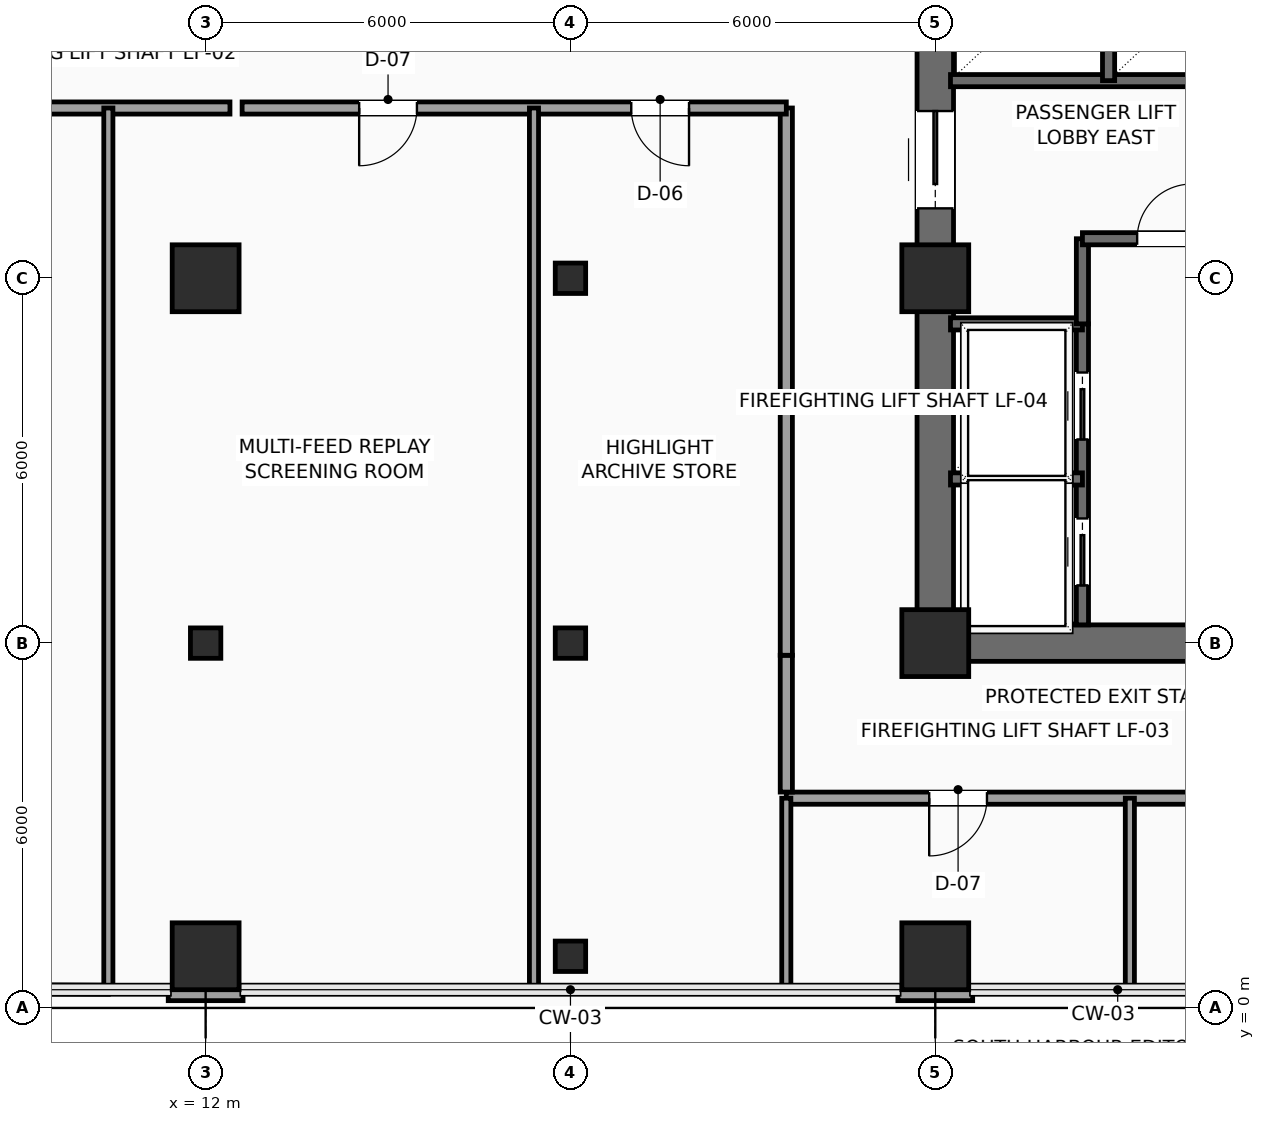
"""IFC4 building model, lengths in metres.
Left out: names, types, materials, properties, quantities, classifications, styles, units other than length and angle.
Written with IfcOpenShell. Run it as: python <this file> out.ifc"""

import sys

from ifc_helpers import new_model, si_unit, direction, frame, frame_2d, origin, origin_2d, place, context, subcontext, project, spatial, rectangle, hollow_rectangle, extrude, element, fill, save


model = new_model("IFC4")
c1 = context("Model", 3, precision=1e-05, world=origin(), true_north=direction((0.0, 1.0)))
c2 = subcontext(c1, "Body", "Model", "MODEL_VIEW")
j1 = project(units=[si_unit("LENGTHUNIT", "METRE"), si_unit("PLANEANGLEUNIT", "RADIAN")], contexts=[c1])
p1 = place(None, origin())
s1 = spatial("IfcSite", under=j1, at=p1, CompositionType="ELEMENT")
p2 = place(p1, origin())
s2 = spatial("IfcBuilding", under=s1, at=p2, CompositionType="ELEMENT")
p3 = place(p2, frame((0.0, 0.0, 107.1)))
s3 = spatial("IfcBuildingStorey", under=s2, at=p3, CompositionType="ELEMENT", Elevation=107.1)
for number, where, z_axis, x_axis in (
    (1, (24.0, 6.0, 0.0), (0.0, 0.0, 1.0), (1.0, 0.0, 0.0)),
    (2, (24.0, 12.0, 0.0), (0.0, 0.0, 1.0), (1.0, 0.0, 0.0)),
    (3, (12.0, 0.85, 0.0), (0.0, 0.0, 1.0), (1.0, 0.0, 0.0)),
):
    element("IfcColumn", number, at=place(p3, frame(where, z_axis=z_axis, x_axis=x_axis)), inside=s3, PredefinedType="COLUMN", context=c2, shape_type="SweptSolid", body=[
        extrude(rectangle(XDim=1.1, YDim=1.1, at=origin_2d()), origin(), (0.0, 0.0, 1.0), 3.75),
    ])
p4 = place(p3, frame((12.0, 6.0, 0.0), z_axis=(0.0, 0.0, 1.0), x_axis=(1.0, 0.0, 0.0)))
e4 = element("IfcColumn", 4, at=p4, inside=s3, PredefinedType="COLUMN", context=c2, shape_type="SweptSolid", body=[
    extrude(hollow_rectangle(XDim=0.5, YDim=0.5, WallThickness=0.025, InnerFilletRadius=0.025, OuterFilletRadius=0.04, at=origin_2d()), origin(), (0.0, 0.0, 1.0), 3.75),
])
p5 = place(p3, frame((12.0, 12.0, 0.0), z_axis=(0.0, 0.0, 1.0), x_axis=(1.0, 0.0, 0.0)))
e5 = element("IfcColumn", 5, at=p5, inside=s3, PredefinedType="COLUMN", context=c2, shape_type="SweptSolid", body=[
    extrude(rectangle(XDim=1.1, YDim=1.1, at=origin_2d()), origin(), (0.0, 0.0, 1.0), 3.75),
])
for number, where, z_axis, x_axis in (
    (6, (18.0, 0.85, 0.0), (0.0, 0.0, 1.0), (1.0, 0.0, 0.0)),
    (7, (18.0, 6.0, 0.0), (0.0, 0.0, 1.0), (1.0, 0.0, 0.0)),
    (8, (18.0, 12.0, 0.0), (0.0, 0.0, 1.0), (1.0, 0.0, 0.0)),
):
    element("IfcColumn", number, at=place(p3, frame(where, z_axis=z_axis, x_axis=x_axis)), inside=s3, PredefinedType="COLUMN", context=c2, shape_type="SweptSolid", body=[
        extrude(hollow_rectangle(XDim=0.5, YDim=0.5, WallThickness=0.025, InnerFilletRadius=0.025, OuterFilletRadius=0.04, at=origin_2d()), origin(), (0.0, 0.0, 1.0), 3.75),
    ])
p6 = place(p3, frame((24.0, 0.85, 0.0), z_axis=(0.0, 0.0, 1.0), x_axis=(1.0, 0.0, 0.0)))
e9 = element("IfcColumn", 9, at=p6, inside=s3, PredefinedType="COLUMN", context=c2, shape_type="SweptSolid", body=[
    extrude(rectangle(XDim=1.1, YDim=1.1, at=origin_2d()), origin(), (0.0, 0.0, 1.0), 3.75),
])
for number, where, z_axis, x_axis in (
    (10, (24.615, 0.24, 0.0), (0.0, 0.0, 1.0), (-1.0, 0.0, 0.0)),
    (11, (12.615, 0.24, 0.0), (0.0, 0.0, 1.0), (-1.0, 0.0, 0.0)),
):
    element("IfcWall", number, at=place(p3, frame(where, z_axis=z_axis, x_axis=x_axis)), inside=s3, PredefinedType="SOLIDWALL", context=c2, shape_type="SweptSolid", body=[
        extrude(rectangle(XDim=1.23, YDim=0.24, at=frame_2d((0.615, 0.0))), origin(), (0.0, 0.0, 1.0), 3.475),
    ])
p7 = place(p3, frame((24.0, 6.0, 0.0), z_axis=(0.0, 0.0, 1.0), x_axis=(1.0, 0.0, 0.0)))
e12 = element("IfcWall", 12, at=p7, inside=s3, PredefinedType="SHEAR", context=c2, shape_type="SweptSolid", body=[
    extrude(rectangle(XDim=9.6, YDim=0.6, at=frame_2d((4.8, 0.0))), origin(), (0.0, 0.0, 1.0), 3.475),
])
p8 = place(p3, frame((24.0, 6.0, 0.0), z_axis=(0.0, 0.0, 1.0), x_axis=(0.0, 1.0, 0.0)))
e13 = element("IfcWall", 13, at=p8, inside=s3, PredefinedType="SHEAR", context=c2, shape_type="SweptSolid", body=[
    extrude(rectangle(XDim=12.0, YDim=0.6, at=frame_2d((6.0, 0.0))), origin(), (0.0, 0.0, 1.0), 3.475),
])
p9 = place(p8, frame((7.15, 0.0, 0.0)))
e14 = element("IfcOpeningElement", 14, at=p9, cuts=e13, PredefinedType="OPENING", context=c2, shape_type="SweptSolid", body=[
    extrude(rectangle(XDim=1.6, YDim=2.3, at=frame_2d((0.8, 1.15))), frame((0.0, 0.31, 0.0), z_axis=(0.0, -1.0, 0.0), x_axis=(1.0, 0.0, 0.0)), (0.0, 0.0, 1.0), 0.62),
])
p10 = place(p3, frame((26.42, 6.3, 0.0), z_axis=(0.0, 0.0, 1.0), x_axis=(0.0, 1.0, 0.0)))
e15 = element("IfcWall", 15, at=p10, inside=s3, PredefinedType="SHEAR", context=c2, shape_type="SweptSolid", body=[
    extrude(rectangle(XDim=4.95, YDim=0.2, at=frame_2d((2.475, 0.0))), origin(), (0.0, 0.0, 1.0), 3.475),
])
p11 = place(p10, frame((0.65, 0.0, 0.0)))
e16 = element("IfcOpeningElement", 16, at=p11, cuts=e15, PredefinedType="OPENING", context=c2, shape_type="SweptSolid", body=[
    extrude(rectangle(XDim=1.1, YDim=2.2, at=frame_2d((0.55, 1.1))), frame((0.0, 0.11, 0.0), z_axis=(0.0, -1.0, 0.0), x_axis=(1.0, 0.0, 0.0)), (0.0, 0.0, 1.0), 0.22),
])
p12 = place(p10, frame((3.05, 0.0, 0.0)))
e17 = element("IfcOpeningElement", 17, at=p12, cuts=e15, PredefinedType="OPENING", context=c2, shape_type="SweptSolid", body=[
    extrude(rectangle(XDim=1.1, YDim=2.2, at=frame_2d((0.55, 1.1))), frame((0.0, 0.11, 0.0), z_axis=(0.0, -1.0, 0.0), x_axis=(1.0, 0.0, 0.0)), (0.0, 0.0, 1.0), 0.22),
])
for number, where, z_axis, x_axis in (
    (18, (24.25, 8.7, 0.0), (0.0, 0.0, 1.0), (1.0, 0.0, 0.0)),
    (19, (24.25, 11.25, 0.0), (0.0, 0.0, 1.0), (1.0, 0.0, 0.0)),
):
    element("IfcWall", number, at=place(p3, frame(where, z_axis=z_axis, x_axis=x_axis)), inside=s3, PredefinedType="SHEAR", context=c2, shape_type="SweptSolid", body=[
        extrude(rectangle(XDim=2.17, YDim=0.2, at=frame_2d((1.085, 0.0))), origin(), (0.0, 0.0, 1.0), 3.475),
    ])
p13 = place(p3, frame((26.42, 11.25, 0.0), z_axis=(0.0, 0.0, 1.0), x_axis=(0.0, 1.0, 0.0)))
e20 = element("IfcWall", 20, at=p13, inside=s3, PredefinedType="SHEAR", context=c2, shape_type="SweptSolid", body=[
    extrude(rectangle(XDim=1.4, YDim=0.2, at=frame_2d((0.7, 0.0))), origin(), (0.0, 0.0, 1.0), 3.475),
])
p14 = place(p3, frame((26.42, 12.65, 0.0), z_axis=(0.0, 0.0, 1.0), x_axis=(1.0, 0.0, 0.0)))
e21 = element("IfcWall", 21, at=p14, inside=s3, PredefinedType="SHEAR", context=c2, shape_type="SweptSolid", body=[
    extrude(rectangle(XDim=2.84, YDim=0.2, at=frame_2d((1.42, 0.0))), origin(), (0.0, 0.0, 1.0), 3.475),
])
p15 = place(p14, frame((0.9, 0.0, 0.0)))
e22 = element("IfcOpeningElement", 22, at=p15, cuts=e21, PredefinedType="OPENING", context=c2, shape_type="SweptSolid", body=[
    extrude(rectangle(XDim=0.9, YDim=2.15, at=frame_2d((0.45, 1.075))), frame((0.0, 0.11, 0.0), z_axis=(0.0, -1.0, 0.0), x_axis=(1.0, 0.0, 0.0)), (0.0, 0.0, 1.0), 0.22),
])
p16 = place(p3, frame((24.25, 15.25, 0.0), z_axis=(0.0, 0.0, 1.0), x_axis=(1.0, 0.0, 0.0)))
e23 = element("IfcWall", 23, at=p16, inside=s3, PredefinedType="SHEAR", context=c2, shape_type="SweptSolid", body=[
    extrude(rectangle(XDim=5.2, YDim=0.2, at=frame_2d((2.6, 0.0))), origin(), (0.0, 0.0, 1.0), 3.475),
])
p17 = place(p3, frame((26.85, 15.25, 0.0), z_axis=(0.0, 0.0, 1.0), x_axis=(0.0, 1.0, 0.0)))
e24 = element("IfcWall", 24, at=p17, inside=s3, PredefinedType="SHEAR", context=c2, shape_type="SweptSolid", body=[
    extrude(rectangle(XDim=2.4, YDim=0.2, at=frame_2d((1.2, 0.0))), origin(), (0.0, 0.0, 1.0), 3.475),
])
p18 = place(p3, frame((36.15, 3.45, 0.0), z_axis=(0.0, 0.0, 1.0), x_axis=(-1.0, 0.0, 0.0)))
e25 = element("IfcWall", 25, at=p18, inside=s3, PredefinedType="PARTITIONING", context=c2, shape_type="SweptSolid", body=[
    extrude(rectangle(XDim=14.6, YDim=0.2, at=frame_2d((7.3, 0.0))), origin(), (0.0, 0.0, 1.0), 3.017),
])
p19 = place(p18, frame((11.3, 0.0, 0.0)))
e26 = element("IfcOpeningElement", 26, at=p19, cuts=e25, PredefinedType="OPENING", context=c2, shape_type="SweptSolid", body=[
    extrude(rectangle(XDim=0.95, YDim=2.15, at=frame_2d((0.475, 1.075))), frame((0.0, 0.11, 0.0), z_axis=(0.0, -1.0, 0.0), x_axis=(1.0, 0.0, 0.0)), (0.0, 0.0, 1.0), 0.22),
])
p20 = place(p18, frame((5.675, 0.0, 0.0)))
e27 = element("IfcOpeningElement", 27, at=p20, cuts=e25, PredefinedType="OPENING", context=c2, shape_type="SweptSolid", body=[
    extrude(rectangle(XDim=0.95, YDim=2.15, at=frame_2d((0.475, 1.075))), frame((0.0, 0.11, 0.0), z_axis=(0.0, -1.0, 0.0), x_axis=(1.0, 0.0, 0.0)), (0.0, 0.0, 1.0), 0.22),
])
p21 = place(p3, frame((21.55, 3.55, 0.0), z_axis=(0.0, 0.0, 1.0), x_axis=(0.0, 1.0, 0.0)))
e28 = element("IfcWall", 28, at=p21, inside=s3, PredefinedType="PARTITIONING", context=c2, shape_type="SweptSolid", body=[
    extrude(rectangle(XDim=2.25, YDim=0.2, at=frame_2d((1.125, 0.0))), origin(), (0.0, 0.0, 1.0), 3.475),
])
p22 = place(p3, frame((21.55, 5.8, 0.0), z_axis=(0.0, 0.0, 1.0), x_axis=(0.0, 1.0, 0.0)))
e29 = element("IfcWall", 29, at=p22, inside=s3, PredefinedType="PARTITIONING", context=c2, shape_type="SweptSolid", body=[
    extrude(rectangle(XDim=9.0, YDim=0.2, at=frame_2d((4.5, 0.0))), origin(), (0.0, 0.0, 1.0), 3.475),
])
p23 = place(p3, frame((21.55, 14.8, 0.0), z_axis=(0.0, 0.0, 1.0), x_axis=(-1.0, 0.0, 0.0)))
e30 = element("IfcWall", 30, at=p23, inside=s3, PredefinedType="PARTITIONING", context=c2, shape_type="SweptSolid", body=[
    extrude(rectangle(XDim=8.95, YDim=0.2, at=frame_2d((4.475, 0.0))), origin(), (0.0, 0.0, 1.0), 3.017),
])
p24 = place(p23, frame((6.075, 0.0, 0.0)))
e31 = element("IfcOpeningElement", 31, at=p24, cuts=e30, PredefinedType="OPENING", context=c2, shape_type="SweptSolid", body=[
    extrude(rectangle(XDim=0.95, YDim=2.15, at=frame_2d((0.475, 1.075))), frame((0.0, 0.11, 0.0), z_axis=(0.0, -1.0, 0.0), x_axis=(1.0, 0.0, 0.0)), (0.0, 0.0, 1.0), 0.22),
])
p25 = place(p23, frame((1.6, 0.0, 0.0)))
e32 = element("IfcOpeningElement", 32, at=p25, cuts=e30, PredefinedType="OPENING", context=c2, shape_type="SweptSolid", body=[
    extrude(rectangle(XDim=0.95, YDim=2.15, at=frame_2d((0.475, 1.075))), frame((0.0, 0.11, 0.0), z_axis=(0.0, -1.0, 0.0), x_axis=(1.0, 0.0, 0.0)), (0.0, 0.0, 1.0), 0.22),
])
p26 = place(p3, frame((12.4, 14.8, 0.0), z_axis=(0.0, 0.0, 1.0), x_axis=(-1.0, 0.0, 0.0)))
e33 = element("IfcWall", 33, at=p26, inside=s3, PredefinedType="PARTITIONING", context=c2, shape_type="SweptSolid", body=[
    extrude(rectangle(XDim=7.15, YDim=0.2, at=frame_2d((3.575, 0.0))), origin(), (0.0, 0.0, 1.0), 3.017),
])
p27 = place(p26, frame((4.1, 0.0, 0.0)))
e34 = element("IfcOpeningElement", 34, at=p27, cuts=e33, PredefinedType="OPENING", context=c2, shape_type="SweptSolid", body=[
    extrude(rectangle(XDim=0.95, YDim=2.15, at=frame_2d((0.475, 1.075))), frame((0.0, 0.11, 0.0), z_axis=(0.0, -1.0, 0.0), x_axis=(1.0, 0.0, 0.0)), (0.0, 0.0, 1.0), 0.22),
])
p28 = place(p3, frame((0.35, 0.35, 0.0), z_axis=(0.0, 0.0, 1.0), x_axis=(0.999987599634, -0.004980017926, 0.0)))
e35 = element("IfcWall", 35, at=p28, inside=s3, PredefinedType="PARTITIONING", context=c2, shape_type="SweptSolid", body=[
    extrude(rectangle(XDim=10.05, YDim=0.15, at=frame_2d((5.025, 0.0))), origin(), (0.0, 0.0, 1.0), 3.475),
])
for number, where, z_axis, x_axis in (
    (36, (10.4, 0.3, 0.0), (0.0, 0.0, 1.0), (0.0, 1.0, 0.0)),
    (37, (17.4, 0.3, 0.0), (0.0, 0.0, 1.0), (0.0, 1.0, 0.0)),
):
    element("IfcWall", number, at=place(p3, frame(where, z_axis=z_axis, x_axis=x_axis)), inside=s3, PredefinedType="PARTITIONING", context=c2, shape_type="SweptSolid", body=[
        extrude(rectangle(XDim=14.5, YDim=0.15, at=frame_2d((7.25, 0.0))), origin(), (0.0, 0.0, 1.0), 3.475),
    ])
for number, where, z_axis, x_axis in (
    (38, (21.55, 0.3, 0.0), (0.0, 0.0, 1.0), (0.0, 1.0, 0.0)),
    (39, (27.2, 0.3, 0.0), (0.0, 0.0, 1.0), (0.0, 1.0, 0.0)),
):
    element("IfcWall", number, at=place(p3, frame(where, z_axis=z_axis, x_axis=x_axis)), inside=s3, PredefinedType="PARTITIONING", context=c2, shape_type="SweptSolid", body=[
        extrude(rectangle(XDim=3.15, YDim=0.15, at=frame_2d((1.575, 0.0))), origin(), (0.0, 0.0, 1.0), 3.475),
    ])
p29 = place(p9, origin())
e40 = element("IfcDoor", 40, at=p29, inside=s3, OperationType="DOUBLE_DOOR_SLIDING", PredefinedType="DOOR", context=c2, shape_type="SweptSolid", body=[
    extrude(rectangle(XDim=1.6, YDim=2.3, at=frame_2d((0.8, 1.15))), frame((0.0, 0.025, 0.0), z_axis=(0.0, -1.0, 0.0), x_axis=(1.0, 0.0, 0.0)), (0.0, 0.0, 1.0), 0.05),
])
fill(e14, e40)
p30 = place(p11, origin())
e41 = element("IfcDoor", 41, at=p30, inside=s3, OperationType="SLIDING_TO_LEFT", PredefinedType="DOOR", context=c2, shape_type="SweptSolid", body=[
    extrude(rectangle(XDim=1.1, YDim=2.2, at=frame_2d((0.55, 1.1))), frame((0.0, 0.025, 0.0), z_axis=(0.0, -1.0, 0.0), x_axis=(1.0, 0.0, 0.0)), (0.0, 0.0, 1.0), 0.05),
])
fill(e16, e41)
p31 = place(p12, origin())
e42 = element("IfcDoor", 42, at=p31, inside=s3, OperationType="SLIDING_TO_LEFT", PredefinedType="DOOR", context=c2, shape_type="SweptSolid", body=[
    extrude(rectangle(XDim=1.1, YDim=2.2, at=frame_2d((0.55, 1.1))), frame((0.0, 0.025, 0.0), z_axis=(0.0, -1.0, 0.0), x_axis=(1.0, 0.0, 0.0)), (0.0, 0.0, 1.0), 0.05),
])
fill(e17, e42)
p32 = place(p15, origin())
e43 = element("IfcDoor", 43, at=p32, inside=s3, OperationType="SINGLE_SWING_RIGHT", PredefinedType="DOOR", context=c2, shape_type="SweptSolid", body=[
    extrude(rectangle(XDim=0.9, YDim=2.15, at=frame_2d((0.45, 1.075))), frame((0.0, 0.025, 0.0), z_axis=(0.0, -1.0, 0.0), x_axis=(1.0, 0.0, 0.0)), (0.0, 0.0, 1.0), 0.05),
])
fill(e22, e43)
p33 = place(p19, origin())
e44 = element("IfcDoor", 44, at=p33, inside=s3, OperationType="SINGLE_SWING_RIGHT", PredefinedType="DOOR", context=c2, shape_type="SweptSolid", body=[
    extrude(rectangle(XDim=0.95, YDim=2.15, at=frame_2d((0.475, 1.075))), frame((0.0, 0.025, 0.0), z_axis=(0.0, -1.0, 0.0), x_axis=(1.0, 0.0, 0.0)), (0.0, 0.0, 1.0), 0.05),
])
fill(e26, e44)
p34 = place(p24, origin())
e45 = element("IfcDoor", 45, at=p34, inside=s3, OperationType="SINGLE_SWING_RIGHT", PredefinedType="DOOR", context=c2, shape_type="SweptSolid", body=[
    extrude(rectangle(XDim=0.95, YDim=2.15, at=frame_2d((0.475, 1.075))), frame((0.0, 0.025, 0.0), z_axis=(0.0, -1.0, 0.0), x_axis=(1.0, 0.0, 0.0)), (0.0, 0.0, 1.0), 0.05),
])
fill(e31, e45)
p35 = place(p25, origin())
e46 = element("IfcDoor", 46, at=p35, inside=s3, OperationType="SINGLE_SWING_LEFT", PredefinedType="DOOR", context=c2, shape_type="SweptSolid", body=[
    extrude(rectangle(XDim=0.95, YDim=2.15, at=frame_2d((0.475, 1.075))), frame((0.0, 0.025, 0.0), z_axis=(0.0, -1.0, 0.0), x_axis=(1.0, 0.0, 0.0)), (0.0, 0.0, 1.0), 0.05),
])
fill(e32, e46)
save(model, sys.argv[1])
